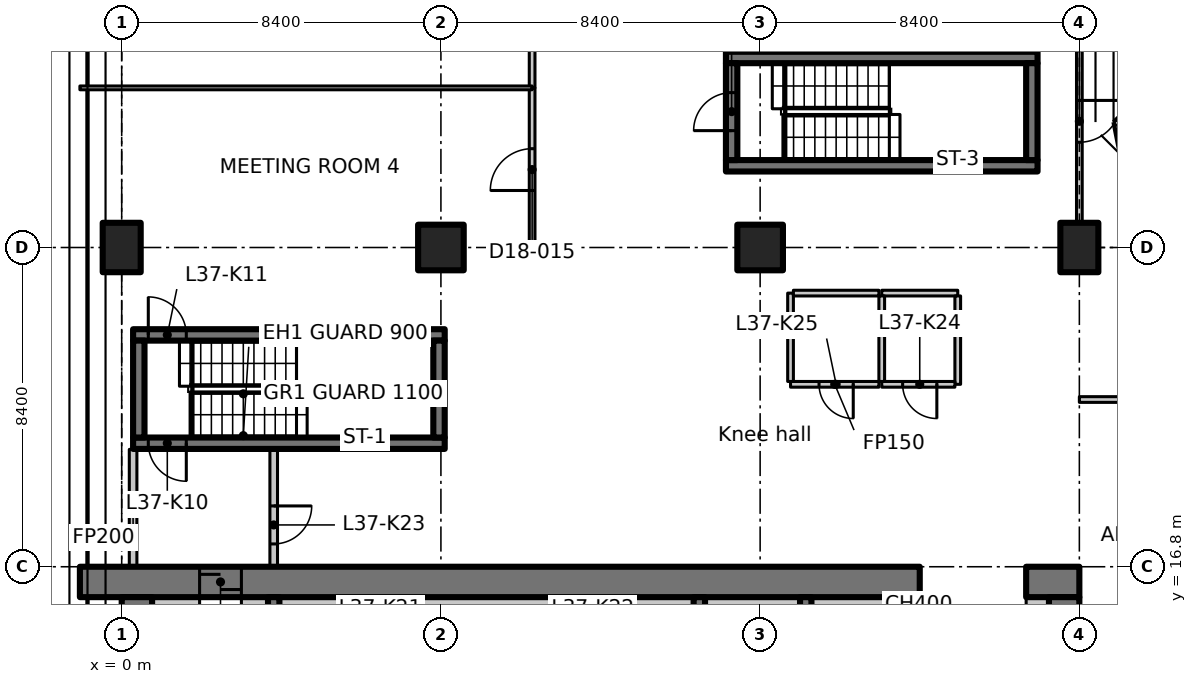
"""IFC4 building model, lengths in metres.
Left out: names, types, materials, properties, quantities, classifications, styles, units other than length and angle.
Written with IfcOpenShell. Run it as: python <this file> out.ifc"""

import sys

from ifc_helpers import new_model, si_unit, direction, frame, frame_2d, origin, origin_2d, place, context, subcontext, project, spatial, polyline, rectangle, outline, extrude, element, fill, save


model = new_model("IFC4")
c1 = context("Model", 3, precision=1e-05, world=origin(), true_north=direction((0.0, 1.0)))
c2 = subcontext(c1, "Body", "Model", "MODEL_VIEW")
j1 = project(units=[si_unit("LENGTHUNIT", "METRE"), si_unit("PLANEANGLEUNIT", "RADIAN")], contexts=[c1])
p1 = place(None, origin())
s1 = spatial("IfcSite", under=j1, at=p1, CompositionType="ELEMENT")
p2 = place(p1, origin())
s2 = spatial("IfcBuilding", under=s1, at=p2, CompositionType="ELEMENT")
p3 = place(p2, frame((0.0, 0.0, 149.3)))
s3 = spatial("IfcBuildingStorey", under=s2, at=p3, CompositionType="ELEMENT", Elevation=149.3)
p4 = place(p3, frame((0.0, 25.2, 0.0), z_axis=(0.0, 0.0, 1.0), x_axis=(1.0, 0.0, 0.0)))
e1 = element("IfcColumn", 1, at=p4, inside=s3, PredefinedType="COLUMN", context=c2, shape_type="SweptSolid", body=[
    extrude(rectangle(XDim=1.0, YDim=1.3, at=origin_2d()), origin(), (0.0, 0.0, 1.0), 3.35),
])
for number, where, z_axis, x_axis in (
    (2, (8.4, 25.2, 0.0), (0.0, 0.0, 1.0), (1.0, 0.0, 0.0)),
    (3, (16.8, 25.2, 0.0), (0.0, 0.0, 1.0), (1.0, 0.0, 0.0)),
):
    element("IfcColumn", number, at=place(p3, frame(where, z_axis=z_axis, x_axis=x_axis)), inside=s3, PredefinedType="COLUMN", context=c2, shape_type="SweptSolid", body=[
        extrude(rectangle(XDim=1.2, YDim=1.2, at=origin_2d()), origin(), (0.0, 0.0, 1.0), 3.35),
    ])
p5 = place(p3, frame((25.2, 25.2, 0.0), z_axis=(0.0, 0.0, 1.0), x_axis=(1.0, 0.0, 0.0)))
e4 = element("IfcColumn", 4, at=p5, inside=s3, PredefinedType="COLUMN", context=c2, shape_type="SweptSolid", body=[
    extrude(rectangle(XDim=1.0, YDim=1.3, at=origin_2d()), origin(), (0.0, 0.0, 1.0), 3.35),
])
p6 = place(p3, frame((-1.1, 16.4, 0.0), z_axis=(0.0, 0.0, 1.0), x_axis=(1.0, 0.0, 0.0)))
e5 = element("IfcWall", 5, at=p6, inside=s3, PredefinedType="SHEAR", context=c2, shape_type="SweptSolid", body=[
    extrude(rectangle(XDim=22.1, YDim=0.8, at=frame_2d((11.05, 0.0))), origin(), (0.0, 0.0, 1.0), 3.35),
])
p7 = place(p6, frame((3.15, 0.0, 0.0)))
e6 = element("IfcOpeningElement", 6, at=p7, cuts=e5, PredefinedType="OPENING", context=c2, shape_type="SweptSolid", body=[
    extrude(rectangle(XDim=1.1, YDim=2.3, at=frame_2d((0.55, 1.15))), frame((0.0, 0.41, 0.0), z_axis=(0.0, -1.0, 0.0), x_axis=(1.0, 0.0, 0.0)), (0.0, 0.0, 1.0), 0.82),
])
p8 = place(p3, frame((23.8, 16.4, 0.0), z_axis=(0.0, 0.0, 1.0), x_axis=(1.0, 0.0, 0.0)))
e7 = element("IfcWall", 7, at=p8, inside=s3, PredefinedType="SHEAR", context=c2, shape_type="SweptSolid", body=[
    extrude(rectangle(XDim=1.4, YDim=0.8, at=frame_2d((0.7, 0.0))), origin(), (0.0, 0.0, 1.0), 3.35),
])
p9 = place(p3, frame((0.4, 7.136, 0.0), z_axis=(0.0, 0.0, 1.0), x_axis=(0.0, 1.0, 0.0)))
e8 = element("IfcWall", 8, at=p9, inside=s3, PredefinedType="SHEAR", context=c2, shape_type="SweptSolid", body=[
    extrude(rectangle(XDim=8.864, YDim=0.8, at=frame_2d((4.432, 0.0))), origin(), (0.0, 0.0, 1.0), 3.35),
])
p10 = place(p3, frame((24.8, 12.6, 0.0), z_axis=(0.0, 0.0, 1.0), x_axis=(0.0, 1.0, 0.0)))
e9 = element("IfcWall", 9, at=p10, inside=s3, PredefinedType="SHEAR", context=c2, shape_type="SweptSolid", body=[
    extrude(rectangle(XDim=3.4, YDim=0.8, at=frame_2d((1.7, 0.0))), origin(), (0.0, 0.0, 1.0), 3.35),
])
p11 = place(p3, frame((0.8, 15.8, 0.0), z_axis=(0.0, 0.0, 1.0), x_axis=(1.0, 0.0, 0.0)))
e10 = element("IfcWall", 10, at=p11, inside=s3, PredefinedType="PARTITIONING", context=c2, shape_type="SweptSolid", body=[
    extrude(rectangle(XDim=1.25, YDim=0.4, at=frame_2d((0.625, 0.0))), origin(), (0.0, 0.0, 1.0), 3.35),
])
p12 = place(p3, frame((23.8, 15.8, 0.0), z_axis=(0.0, 0.0, 1.0), x_axis=(1.0, 0.0, 0.0)))
e11 = element("IfcWall", 11, at=p12, inside=s3, PredefinedType="PARTITIONING", context=c2, shape_type="SweptSolid", body=[
    extrude(rectangle(XDim=0.6, YDim=0.4, at=frame_2d((0.3, 0.0))), origin(), (0.0, 0.0, 1.0), 3.35),
])
for number, where, z_axis, x_axis in (
    (12, (4.0, 12.95, 0.0), (0.0, 0.0, 1.0), (0.0, 1.0, 0.0)),
    (13, (15.2, 12.95, 0.0), (0.0, 0.0, 1.0), (0.0, 1.0, 0.0)),
    (14, (18.0, 12.95, 0.0), (0.0, 0.0, 1.0), (0.0, 1.0, 0.0)),
    (15, (20.8, 12.95, 0.0), (0.0, 0.0, 1.0), (0.0, 1.0, 0.0)),
):
    element("IfcWall", number, at=place(p3, frame(where, z_axis=z_axis, x_axis=x_axis)), inside=s3, PredefinedType="SHEAR", context=c2, shape_type="SweptSolid", body=[
        extrude(rectangle(XDim=3.05, YDim=0.3, at=frame_2d((1.525, 0.0))), origin(), (0.0, 0.0, 1.0), 3.35),
    ])
p13 = place(p3, frame((8.5, 20.05, 0.0), z_axis=(0.0, 0.0, 1.0), x_axis=(-1.0, 0.0, 0.0)))
e16 = element("IfcWall", 16, at=p13, inside=s3, PredefinedType="SHEAR", context=c2, shape_type="SweptSolid", body=[
    extrude(rectangle(XDim=8.2, YDim=0.3, at=frame_2d((4.1, 0.0))), origin(), (0.0, 0.0, 1.0), 3.35),
])
p14 = place(p13, frame((6.8, 0.0, 0.0)))
e17 = element("IfcOpeningElement", 17, at=p14, cuts=e16, PredefinedType="OPENING", context=c2, shape_type="SweptSolid", body=[
    extrude(rectangle(XDim=1.0, YDim=2.1, at=frame_2d((0.5, 1.05))), frame((0.0, 0.16, 0.0), z_axis=(0.0, -1.0, 0.0), x_axis=(1.0, 0.0, 0.0)), (0.0, 0.0, 1.0), 0.32),
])
p15 = place(p3, frame((0.3, 22.9, 0.0), z_axis=(0.0, 0.0, 1.0), x_axis=(1.0, 0.0, 0.0)))
e18 = element("IfcWall", 18, at=p15, inside=s3, PredefinedType="SHEAR", context=c2, shape_type="SweptSolid", body=[
    extrude(rectangle(XDim=8.2, YDim=0.3, at=frame_2d((4.1, 0.0))), origin(), (0.0, 0.0, 1.0), 3.35),
])
p16 = place(p15, frame((0.4, 0.0, 0.0)))
e19 = element("IfcOpeningElement", 19, at=p16, cuts=e18, PredefinedType="OPENING", context=c2, shape_type="SweptSolid", body=[
    extrude(rectangle(XDim=1.0, YDim=2.1, at=frame_2d((0.5, 1.05))), frame((0.0, 0.16, 0.0), z_axis=(0.0, -1.0, 0.0), x_axis=(1.0, 0.0, 0.0)), (0.0, 0.0, 1.0), 0.32),
])
for number, where, z_axis, x_axis in (
    (20, (0.45, 20.2, 0.0), (0.0, 0.0, 1.0), (0.0, 1.0, 0.0)),
    (21, (8.35, 20.2, 0.0), (0.0, 0.0, 1.0), (0.0, 1.0, 0.0)),
):
    element("IfcWall", number, at=place(p3, frame(where, z_axis=z_axis, x_axis=x_axis)), inside=s3, PredefinedType="SHEAR", context=c2, shape_type="SweptSolid", body=[
        extrude(rectangle(XDim=2.55, YDim=0.3, at=frame_2d((1.275, 0.0))), origin(), (0.0, 0.0, 1.0), 3.35),
    ])
for number, where, z_axis, x_axis in (
    (22, (15.9, 27.35, 0.0), (0.0, 0.0, 1.0), (1.0, 0.0, 0.0)),
    (23, (15.9, 30.2, 0.0), (0.0, 0.0, 1.0), (1.0, 0.0, 0.0)),
):
    element("IfcWall", number, at=place(p3, frame(where, z_axis=z_axis, x_axis=x_axis)), inside=s3, PredefinedType="SHEAR", context=c2, shape_type="SweptSolid", body=[
        extrude(rectangle(XDim=8.2, YDim=0.3, at=frame_2d((4.1, 0.0))), origin(), (0.0, 0.0, 1.0), 3.35),
    ])
p17 = place(p3, frame((16.05, 27.5, 0.0), z_axis=(0.0, 0.0, 1.0), x_axis=(0.0, 1.0, 0.0)))
e24 = element("IfcWall", 24, at=p17, inside=s3, PredefinedType="SHEAR", context=c2, shape_type="SweptSolid", body=[
    extrude(rectangle(XDim=2.55, YDim=0.3, at=frame_2d((1.275, 0.0))), origin(), (0.0, 0.0, 1.0), 3.35),
])
p18 = place(p17, frame((0.775, 0.0, 0.0)))
e25 = element("IfcOpeningElement", 25, at=p18, cuts=e24, PredefinedType="OPENING", context=c2, shape_type="SweptSolid", body=[
    extrude(rectangle(XDim=1.0, YDim=2.1, at=frame_2d((0.5, 1.05))), frame((0.0, 0.16, 0.0), z_axis=(0.0, -1.0, 0.0), x_axis=(1.0, 0.0, 0.0)), (0.0, 0.0, 1.0), 0.32),
])
p19 = place(p3, frame((23.95, 27.5, 0.0), z_axis=(0.0, 0.0, 1.0), x_axis=(0.0, 1.0, 0.0)))
e26 = element("IfcWall", 26, at=p19, inside=s3, PredefinedType="SHEAR", context=c2, shape_type="SweptSolid", body=[
    extrude(rectangle(XDim=2.55, YDim=0.3, at=frame_2d((1.275, 0.0))), origin(), (0.0, 0.0, 1.0), 3.35),
])
p20 = place(p3, frame((0.3, 16.812, 0.0), z_axis=(0.0, 0.0, 1.0), x_axis=(0.0, 1.0, 0.0)))
e27 = element("IfcWall", 27, at=p20, inside=s3, PredefinedType="PARTITIONING", context=c2, shape_type="SweptSolid", body=[
    extrude(rectangle(XDim=3.076, YDim=0.2, at=frame_2d((1.538, 0.0))), origin(), (0.0, 0.0, 1.0), 2.98),
])
p21 = place(p3, frame((4.0, 19.888, 0.0), z_axis=(0.0, 0.0, 1.0), x_axis=(0.0, -1.0, 0.0)))
e28 = element("IfcWall", 28, at=p21, inside=s3, PredefinedType="PARTITIONING", context=c2, shape_type="SweptSolid", body=[
    extrude(rectangle(XDim=3.076, YDim=0.2, at=frame_2d((1.538, 0.0))), origin(), (0.0, 0.0, 1.0), 3.35),
])
p22 = place(p21, frame((1.488, 0.0, 0.0)))
e29 = element("IfcOpeningElement", 29, at=p22, cuts=e28, PredefinedType="OPENING", context=c2, shape_type="SweptSolid", body=[
    extrude(rectangle(XDim=1.0, YDim=2.1, at=frame_2d((0.5, 1.05))), frame((0.0, 0.11, 0.0), z_axis=(0.0, -1.0, 0.0), x_axis=(1.0, 0.0, 0.0)), (0.0, 0.0, 1.0), 0.22),
])
p23 = place(p3, frame((20.0, 24.0, 0.0), z_axis=(0.0, 0.0, 1.0), x_axis=(1.0, 0.0, 0.0)))
e30 = element("IfcWall", 30, at=p23, inside=s3, PredefinedType="PARTITIONING", context=c2, shape_type="SweptSolid", body=[
    extrude(rectangle(XDim=2.0, YDim=0.15, at=frame_2d((1.0, 0.0))), origin(), (0.0, 0.0, 1.0), 3.35),
])
p24 = place(p3, frame((22.0, 23.925, 0.0), z_axis=(0.0, 0.0, 1.0), x_axis=(0.0, -1.0, 0.0)))
e31 = element("IfcWall", 31, at=p24, inside=s3, PredefinedType="PARTITIONING", context=c2, shape_type="SweptSolid", body=[
    extrude(rectangle(XDim=2.325, YDim=0.15, at=frame_2d((1.163, 0.0))), origin(), (0.0, 0.0, 1.0), 3.35),
])
p25 = place(p3, frame((21.925, 21.6, 0.0), z_axis=(0.0, 0.0, 1.0), x_axis=(-1.0, 0.0, 0.0)))
e32 = element("IfcWall", 32, at=p25, inside=s3, PredefinedType="PARTITIONING", context=c2, shape_type="SweptSolid", body=[
    extrude(rectangle(XDim=1.925, YDim=0.15, at=frame_2d((0.962, 0.0))), origin(), (0.0, 0.0, 1.0), 3.35),
])
p26 = place(p25, frame((0.475, 0.0, 0.0)))
e33 = element("IfcOpeningElement", 33, at=p26, cuts=e32, PredefinedType="OPENING", context=c2, shape_type="SweptSolid", body=[
    extrude(rectangle(XDim=0.9, YDim=2.1, at=frame_2d((0.45, 1.05))), frame((0.0, 0.085, 0.0), z_axis=(0.0, -1.0, 0.0), x_axis=(1.0, 0.0, 0.0)), (0.0, 0.0, 1.0), 0.17),
])
p27 = place(p3, frame((20.0, 21.675, 0.0), z_axis=(0.0, 0.0, 1.0), x_axis=(0.0, 1.0, 0.0)))
e34 = element("IfcWall", 34, at=p27, inside=s3, PredefinedType="PARTITIONING", context=c2, shape_type="SweptSolid", body=[
    extrude(rectangle(XDim=2.25, YDim=0.15, at=frame_2d((1.125, 0.0))), origin(), (0.0, 0.0, 1.0), 3.35),
])
p28 = place(p3, frame((19.925, 21.6, 0.0), z_axis=(0.0, 0.0, 1.0), x_axis=(-1.0, 0.0, 0.0)))
e35 = element("IfcWall", 35, at=p28, inside=s3, PredefinedType="PARTITIONING", context=c2, shape_type="SweptSolid", body=[
    extrude(rectangle(XDim=2.325, YDim=0.15, at=frame_2d((1.163, 0.0))), origin(), (0.0, 0.0, 1.0), 3.35),
])
p29 = place(p28, frame((0.675, 0.0, 0.0)))
e36 = element("IfcOpeningElement", 36, at=p29, cuts=e35, PredefinedType="OPENING", context=c2, shape_type="SweptSolid", body=[
    extrude(rectangle(XDim=0.9, YDim=2.1, at=frame_2d((0.45, 1.05))), frame((0.0, 0.085, 0.0), z_axis=(0.0, -1.0, 0.0), x_axis=(1.0, 0.0, 0.0)), (0.0, 0.0, 1.0), 0.17),
])
p30 = place(p3, frame((17.6, 21.675, 0.0), z_axis=(0.0, 0.0, 1.0), x_axis=(0.0, 1.0, 0.0)))
e37 = element("IfcWall", 37, at=p30, inside=s3, PredefinedType="PARTITIONING", context=c2, shape_type="SweptSolid", body=[
    extrude(rectangle(XDim=2.325, YDim=0.15, at=frame_2d((1.163, 0.0))), origin(), (0.0, 0.0, 1.0), 3.35),
])
p31 = place(p3, frame((17.675, 24.0, 0.0), z_axis=(0.0, 0.0, 1.0), x_axis=(1.0, 0.0, 0.0)))
e38 = element("IfcWall", 38, at=p31, inside=s3, PredefinedType="PARTITIONING", context=c2, shape_type="SweptSolid", body=[
    extrude(rectangle(XDim=2.25, YDim=0.15, at=frame_2d((1.125, 0.0))), origin(), (0.0, 0.0, 1.0), 3.35),
])
p32 = place(p3, frame((3.15, 15.8, 0.0), z_axis=(0.0, 0.0, 1.0), x_axis=(1.0, 0.0, 0.0)))
e39 = element("IfcWall", 39, at=p32, inside=s3, PredefinedType="PARTITIONING", context=c2, shape_type="SweptSolid", body=[
    extrude(rectangle(XDim=0.7, YDim=0.4, at=frame_2d((0.35, 0.0))), origin(), (0.0, 0.0, 1.0), 3.35),
])
p33 = place(p3, frame((4.15, 15.8, 0.0), z_axis=(0.0, 0.0, 1.0), x_axis=(1.0, 0.0, 0.0)))
e40 = element("IfcWall", 40, at=p33, inside=s3, PredefinedType="PARTITIONING", context=c2, shape_type="SweptSolid", body=[
    extrude(rectangle(XDim=10.9, YDim=0.4, at=frame_2d((5.45, 0.0))), origin(), (0.0, 0.0, 1.0), 3.35),
])
for number, where, z_axis, x_axis in (
    (41, (15.35, 15.8, 0.0), (0.0, 0.0, 1.0), (1.0, 0.0, 0.0)),
    (42, (18.15, 15.8, 0.0), (0.0, 0.0, 1.0), (1.0, 0.0, 0.0)),
):
    element("IfcWall", number, at=place(p3, frame(where, z_axis=z_axis, x_axis=x_axis)), inside=s3, PredefinedType="PARTITIONING", context=c2, shape_type="SweptSolid", body=[
        extrude(rectangle(XDim=2.5, YDim=0.4, at=frame_2d((1.25, 0.0))), origin(), (0.0, 0.0, 1.0), 3.35),
    ])
p34 = place(p3, frame((20.95, 15.8, 0.0), z_axis=(0.0, 0.0, 1.0), x_axis=(1.0, 0.0, 0.0)))
e43 = element("IfcWall", 43, at=p34, inside=s3, PredefinedType="PARTITIONING", context=c2, shape_type="SweptSolid", body=[
    extrude(rectangle(XDim=0.05, YDim=0.4, at=frame_2d((0.025, 0.0))), origin(), (0.0, 0.0, 1.0), 3.35),
])
p35 = place(p3, frame((25.2, 21.2, 0.0), z_axis=(0.0, 0.0, 1.0), x_axis=(1.0, 0.0, 0.0)))
e44 = element("IfcWall", 44, at=p35, inside=s3, PredefinedType="PARTITIONING", context=c2, shape_type="SweptSolid", body=[
    extrude(rectangle(XDim=4.2, YDim=0.15, at=frame_2d((2.1, 0.0))), origin(), (0.0, 0.0, 1.0), 3.33),
])
p36 = place(p3, frame((25.2, 31.0, 0.0), z_axis=(0.0, 0.0, 1.0), x_axis=(0.0, -1.0, 0.0)))
e45 = element("IfcWall", 45, at=p36, inside=s3, PredefinedType="PARTITIONING", context=c2, shape_type="SweptSolid", body=[
    extrude(outline(polyline([(0.0, 0.0), (5.13, 0.0), (5.13, 2.98), (0.0, 2.98), (0.0, 0.0)])), frame((0.0, 0.075, 0.0), z_axis=(0.0, -1.0, 0.0), x_axis=(1.0, 0.0, 0.0)), (0.0, 0.0, 1.0), 0.15),
])
p37 = place(p36, frame((1.93, 0.0, 0.0)))
e46 = element("IfcOpeningElement", 46, at=p37, cuts=e45, PredefinedType="OPENING", context=c2, shape_type="SweptSolid", body=[
    extrude(rectangle(XDim=1.1, YDim=2.1, at=frame_2d((0.55, 1.05))), frame((0.0, 0.085, 0.0), z_axis=(0.0, -1.0, 0.0), x_axis=(1.0, 0.0, 0.0)), (0.0, 0.0, 1.0), 0.17),
])
p38 = place(p3, frame((10.8, 25.2, 0.0), z_axis=(0.0, 0.0, 1.0), x_axis=(0.0, 1.0, 0.0)))
e47 = element("IfcWall", 47, at=p38, inside=s3, PredefinedType="PARTITIONING", context=c2, shape_type="SweptSolid", body=[
    extrude(rectangle(XDim=4.2, YDim=0.15, at=frame_2d((2.1, 0.0))), origin(), (0.0, 0.0, 1.0), 3.33),
])
p39 = place(p38, frame((1.5, 0.0, 0.0)))
e48 = element("IfcOpeningElement", 48, at=p39, cuts=e47, PredefinedType="OPENING", context=c2, shape_type="SweptSolid", body=[
    extrude(rectangle(XDim=1.1, YDim=2.1, at=frame_2d((0.55, 1.05))), frame((0.0, 0.085, 0.0), z_axis=(0.0, -1.0, 0.0), x_axis=(1.0, 0.0, 0.0)), (0.0, 0.0, 1.0), 0.17),
])
p40 = place(p3, frame((10.8, 29.4, 0.0), z_axis=(0.0, 0.0, 1.0), x_axis=(0.0, 1.0, 0.0)))
e49 = element("IfcWall", 49, at=p40, inside=s3, PredefinedType="PARTITIONING", context=c2, shape_type="SweptSolid", body=[
    extrude(rectangle(XDim=4.2, YDim=0.15, at=frame_2d((2.1, 0.0))), origin(), (0.0, 0.0, 1.0), 3.33),
])
p41 = place(p40, frame((1.5, 0.0, 0.0)))
e50 = element("IfcOpeningElement", 50, at=p41, cuts=e49, PredefinedType="OPENING", context=c2, shape_type="SweptSolid", body=[
    extrude(rectangle(XDim=1.1, YDim=2.1, at=frame_2d((0.55, 1.05))), frame((0.0, 0.085, 0.0), z_axis=(0.0, -1.0, 0.0), x_axis=(1.0, 0.0, 0.0)), (0.0, 0.0, 1.0), 0.17),
])
p42 = place(p3, frame((-1.1, 29.4, 0.0), z_axis=(0.0, 0.0, 1.0), x_axis=(1.0, 0.0, 0.0)))
e51 = element("IfcWall", 51, at=p42, inside=s3, PredefinedType="PARTITIONING", context=c2, shape_type="SweptSolid", body=[
    extrude(outline(polyline([(0.0, 0.0), (11.9, 0.0), (11.9, 3.33), (1.55, 3.33), (1.548, 2.98), (0.652, 2.98), (0.65, 3.33), (0.0, 3.33), (0.0, 0.0)])), frame((0.0, 0.05, 0.0), z_axis=(0.0, -1.0, 0.0), x_axis=(1.0, 0.0, 0.0)), (0.0, 0.0, 1.0), 0.1),
])
p43 = place(p7, origin())
e52 = element("IfcDoor", 52, at=p43, inside=s3, OperationType="SLIDING_TO_LEFT", PredefinedType="DOOR", context=c2, shape_type="SweptSolid", body=[
    extrude(rectangle(XDim=1.1, YDim=2.3, at=frame_2d((0.55, 1.15))), frame((0.0, 0.025, 0.0), z_axis=(0.0, -1.0, 0.0), x_axis=(1.0, 0.0, 0.0)), (0.0, 0.0, 1.0), 0.05),
])
fill(e6, e52)
p44 = place(p14, origin())
e53 = element("IfcDoor", 53, at=p44, inside=s3, OperationType="SINGLE_SWING_RIGHT", PredefinedType="DOOR", context=c2, shape_type="SweptSolid", body=[
    extrude(rectangle(XDim=1.0, YDim=2.1, at=frame_2d((0.5, 1.05))), frame((0.0, 0.025, 0.0), z_axis=(0.0, -1.0, 0.0), x_axis=(1.0, 0.0, 0.0)), (0.0, 0.0, 1.0), 0.05),
])
fill(e17, e53)
p45 = place(p16, origin())
e54 = element("IfcDoor", 54, at=p45, inside=s3, OperationType="SINGLE_SWING_LEFT", PredefinedType="DOOR", context=c2, shape_type="SweptSolid", body=[
    extrude(rectangle(XDim=1.0, YDim=2.1, at=frame_2d((0.5, 1.05))), frame((0.0, 0.025, 0.0), z_axis=(0.0, -1.0, 0.0), x_axis=(1.0, 0.0, 0.0)), (0.0, 0.0, 1.0), 0.05),
])
fill(e19, e54)
p46 = place(p18, origin())
e55 = element("IfcDoor", 55, at=p46, inside=s3, OperationType="SINGLE_SWING_RIGHT", PredefinedType="DOOR", context=c2, shape_type="SweptSolid", body=[
    extrude(rectangle(XDim=1.0, YDim=2.1, at=frame_2d((0.5, 1.05))), frame((0.0, 0.025, 0.0), z_axis=(0.0, -1.0, 0.0), x_axis=(1.0, 0.0, 0.0)), (0.0, 0.0, 1.0), 0.05),
])
fill(e25, e55)
p47 = place(p22, origin())
e56 = element("IfcDoor", 56, at=p47, inside=s3, OperationType="SINGLE_SWING_LEFT", PredefinedType="DOOR", context=c2, shape_type="SweptSolid", body=[
    extrude(rectangle(XDim=1.0, YDim=2.1, at=frame_2d((0.5, 1.05))), frame((0.0, 0.025, 0.0), z_axis=(0.0, -1.0, 0.0), x_axis=(1.0, 0.0, 0.0)), (0.0, 0.0, 1.0), 0.05),
])
fill(e29, e56)
p48 = place(p26, origin())
e57 = element("IfcDoor", 57, at=p48, inside=s3, OperationType="SINGLE_SWING_RIGHT", PredefinedType="DOOR", context=c2, shape_type="SweptSolid", body=[
    extrude(rectangle(XDim=0.9, YDim=2.1, at=frame_2d((0.45, 1.05))), frame((0.0, 0.025, 0.0), z_axis=(0.0, -1.0, 0.0), x_axis=(1.0, 0.0, 0.0)), (0.0, 0.0, 1.0), 0.05),
])
fill(e33, e57)
p49 = place(p29, origin())
e58 = element("IfcDoor", 58, at=p49, inside=s3, OperationType="SINGLE_SWING_LEFT", PredefinedType="DOOR", context=c2, shape_type="SweptSolid", body=[
    extrude(rectangle(XDim=0.9, YDim=2.1, at=frame_2d((0.45, 1.05))), frame((0.0, 0.025, 0.0), z_axis=(0.0, -1.0, 0.0), x_axis=(1.0, 0.0, 0.0)), (0.0, 0.0, 1.0), 0.05),
])
fill(e36, e58)
p50 = place(p37, origin())
e59 = element("IfcDoor", 59, at=p50, inside=s3, OperationType="SINGLE_SWING_RIGHT", PredefinedType="DOOR", context=c2, shape_type="SweptSolid", body=[
    extrude(rectangle(XDim=1.1, YDim=2.1, at=frame_2d((0.55, 1.05))), frame((0.0, 0.025, 0.0), z_axis=(0.0, -1.0, 0.0), x_axis=(1.0, 0.0, 0.0)), (0.0, 0.0, 1.0), 0.05),
])
fill(e46, e59)
p51 = place(p39, origin())
e60 = element("IfcDoor", 60, at=p51, inside=s3, OperationType="SINGLE_SWING_LEFT", PredefinedType="DOOR", context=c2, shape_type="SweptSolid", body=[
    extrude(rectangle(XDim=1.1, YDim=2.1, at=frame_2d((0.55, 1.05))), frame((0.0, 0.025, 0.0), z_axis=(0.0, -1.0, 0.0), x_axis=(1.0, 0.0, 0.0)), (0.0, 0.0, 1.0), 0.05),
])
fill(e48, e60)
save(model, sys.argv[1])
